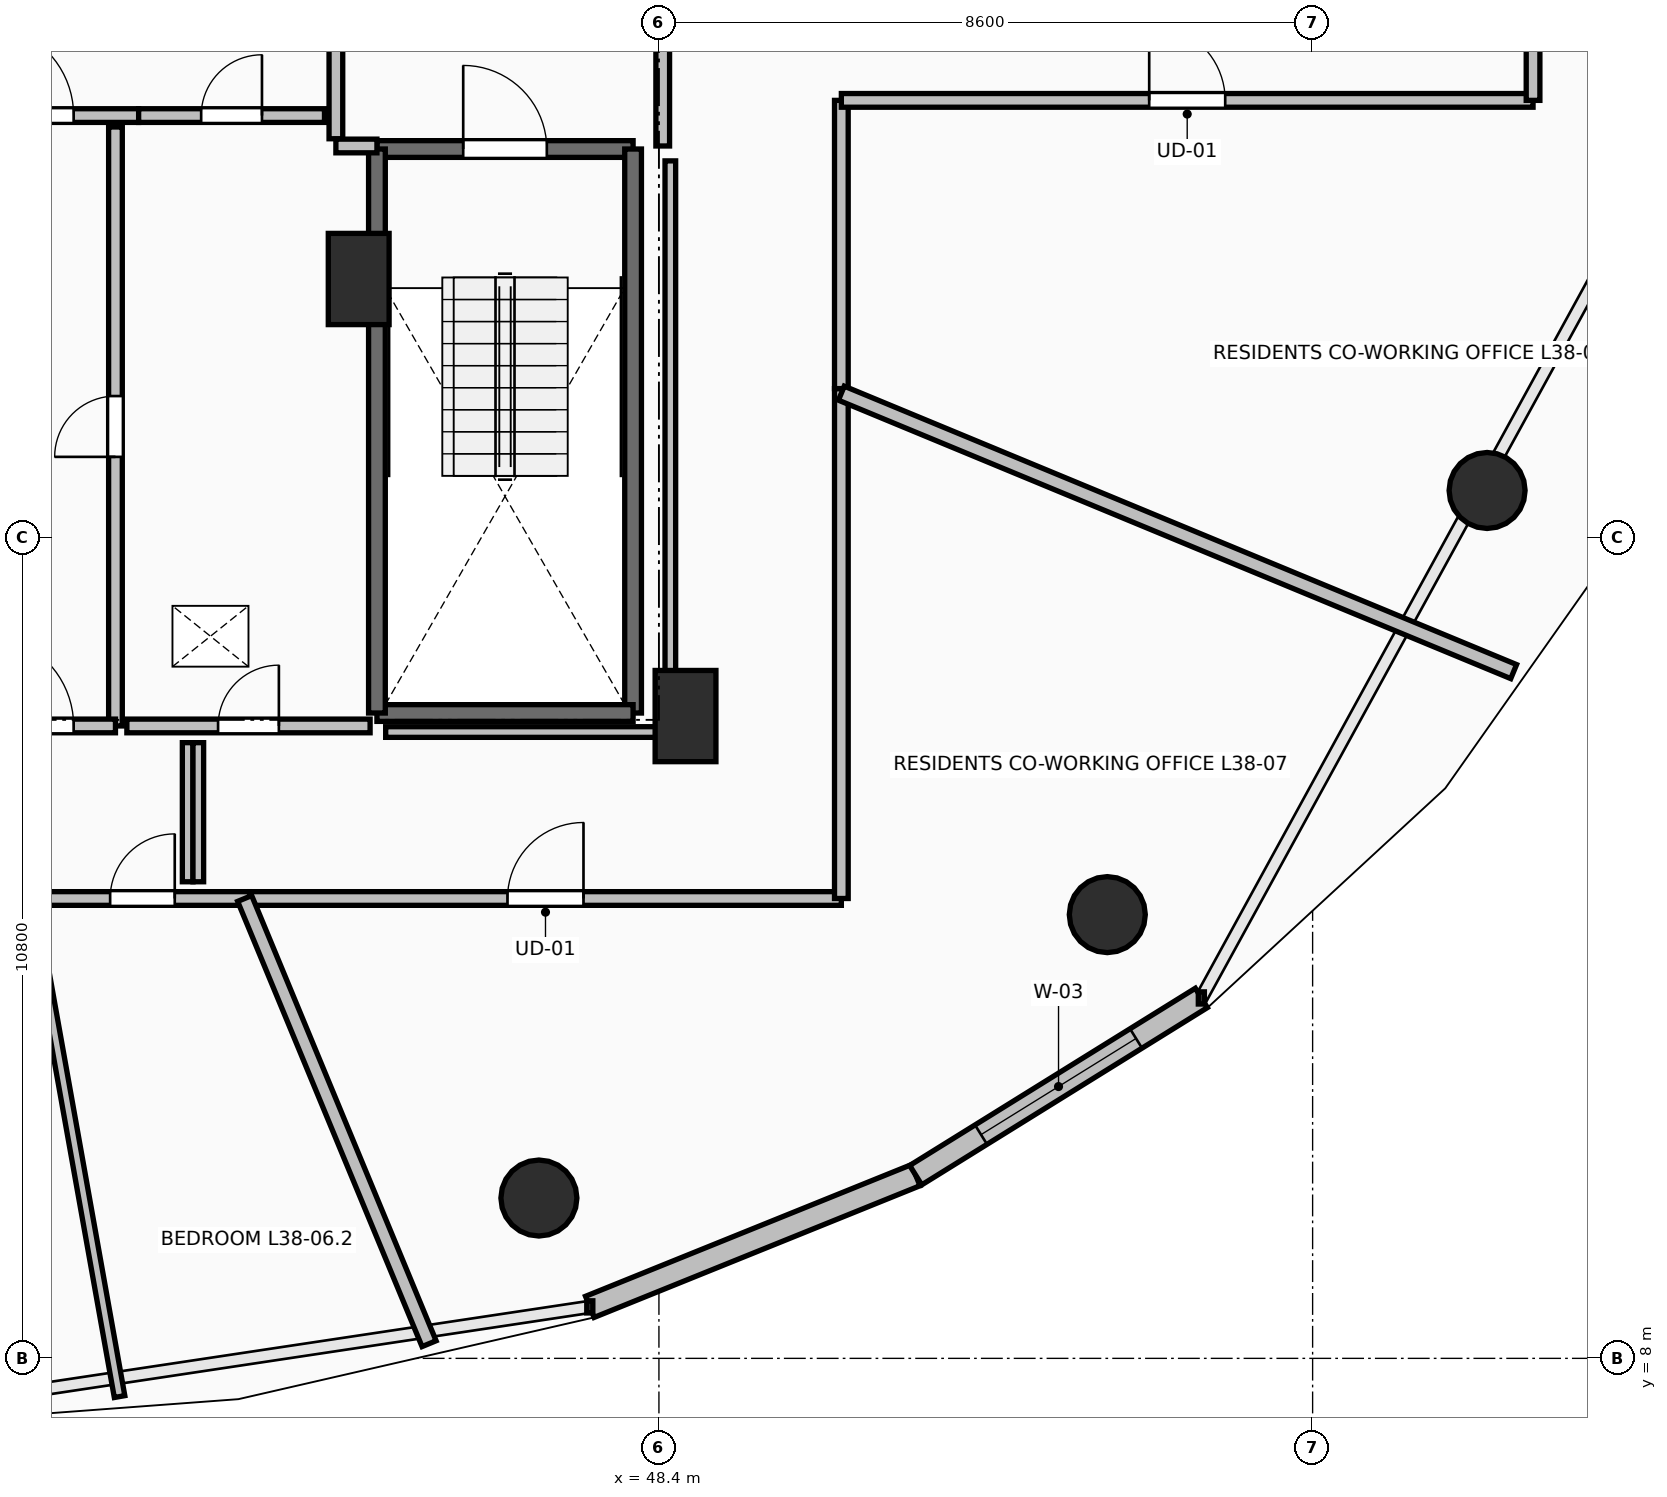
"""IFC4 building model, lengths in metres.
Left out: names, types, materials, properties, quantities, classifications, styles, units other than length and angle.
Written with IfcOpenShell. Run it as: python <this file> out.ifc"""

import sys

from ifc_helpers import new_model, si_unit, direction, frame, frame_2d, origin, origin_2d, place, context, subcontext, project, spatial, rectangle, circle, extrude, element, fill, save


model = new_model("IFC4")
c1 = context("Model", 3, precision=1e-05, world=origin(), true_north=direction((0.0, 1.0)))
c2 = subcontext(c1, "Body", "Model", "MODEL_VIEW")
j1 = project(units=[si_unit("LENGTHUNIT", "METRE"), si_unit("PLANEANGLEUNIT", "RADIAN")], contexts=[c1])
p1 = place(None, origin())
s1 = spatial("IfcSite", under=j1, at=p1, CompositionType="ELEMENT")
p2 = place(p1, origin())
s2 = spatial("IfcBuilding", under=s1, at=p2, CompositionType="ELEMENT")
p3 = place(p2, frame((0.0, 0.0, 143.1)))
s3 = spatial("IfcBuildingStorey", under=s2, at=p3, CompositionType="ELEMENT", Elevation=143.1)
for number, where, z_axis, x_axis in (
    (1, (46.821, 10.109, 0.0), (0.0, 0.0, 1.0), (0.383, -0.924, 0.0)),
    (2, (54.299, 13.838, 0.0), (0.0, 0.0, 1.0), (0.707, -0.707, 0.0)),
    (3, (59.295, 19.418, 0.0), (0.0, 0.0, 1.0), (0.924, -0.383, 0.0)),
):
    element("IfcColumn", number, at=place(p3, frame(where, z_axis=z_axis, x_axis=x_axis)), inside=s3, PredefinedType="COLUMN", context=c2, shape_type="SweptSolid", body=[
        extrude(circle(Radius=0.5, at=origin_2d()), origin(), (0.0, 0.0, 1.0), 3.5),
    ])
for number, where, z_axis, x_axis in (
    (4, (48.75, 16.45, 0.0), (0.0, 0.0, 1.0), (1.0, 0.0, 0.0)),
    (5, (44.45, 22.2, 0.0), (0.0, 0.0, 1.0), (1.0, 0.0, 0.0)),
):
    element("IfcColumn", number, at=place(p3, frame(where, z_axis=z_axis, x_axis=x_axis)), inside=s3, PredefinedType="PILASTER", context=c2, shape_type="SweptSolid", body=[
        extrude(rectangle(XDim=0.8, YDim=1.2, at=origin_2d()), origin(), (0.0, 0.0, 1.0), 3.5),
    ])
p4 = place(p3, frame((47.49, 8.677, 0.0), z_axis=(0.0, 0.0, 1.0), x_axis=(0.927156504392, 0.374674280359, 0.0)))
e6 = element("IfcWall", 6, at=p4, inside=s3, PredefinedType="STANDARD", context=c2, shape_type="SweptSolid", body=[
    extrude(rectangle(XDim=4.625, YDim=0.3, at=frame_2d((2.312, 0.0))), origin(), (0.0, 0.0, 1.0), 3.24),
])
p5 = place(p3, frame((51.778, 10.41, 0.0), z_axis=(0.0, 0.0, 1.0), x_axis=(0.849721181976, 0.527232313977, 0.0)))
e7 = element("IfcWall", 7, at=p5, inside=s3, PredefinedType="STANDARD", context=c2, shape_type="SweptSolid", body=[
    extrude(rectangle(XDim=4.423, YDim=0.3, at=frame_2d((2.211, 0.0))), origin(), (0.0, 0.0, 1.0), 3.24),
])
p6 = place(p5, frame((1.011, 0.0, 0.85)))
e8 = element("IfcOpeningElement", 8, at=p6, cuts=e7, PredefinedType="OPENING", context=c2, shape_type="SweptSolid", body=[
    extrude(rectangle(XDim=2.4, YDim=2.19, at=frame_2d((1.2, 1.095))), frame((0.0, 0.165, 0.0), z_axis=(0.0, -1.0, 0.0), x_axis=(1.0, 0.0, 0.0)), (0.0, 0.0, 1.0), 0.33),
])
p7 = place(p3, frame((44.69, 23.91, 0.0), z_axis=(0.0, 0.0, 1.0), x_axis=(1.0, 0.0, 0.0)))
e9 = element("IfcWall", 9, at=p7, inside=s3, PredefinedType="SOLIDWALL", context=c2, shape_type="SweptSolid", body=[
    extrude(rectangle(XDim=3.37, YDim=0.22, at=frame_2d((1.685, 0.0))), origin(), (0.0, 0.0, 1.0), 3.24),
])
p8 = place(p7, frame((1.135, 0.0, 0.0)))
e10 = element("IfcOpeningElement", 10, at=p8, cuts=e9, PredefinedType="OPENING", context=c2, shape_type="SweptSolid", body=[
    extrude(rectangle(XDim=1.1, YDim=2.15, at=frame_2d((0.55, 1.075))), frame((0.0, 0.125, 0.0), z_axis=(0.0, -1.0, 0.0), x_axis=(1.0, 0.0, 0.0)), (0.0, 0.0, 1.0), 0.25),
])
p9 = place(p3, frame((48.06, 23.91, 0.0), z_axis=(0.0, 0.0, 1.0), x_axis=(0.0, -1.0, 0.0)))
e11 = element("IfcWall", 11, at=p9, inside=s3, PredefinedType="SOLIDWALL", context=c2, shape_type="SweptSolid", body=[
    extrude(rectangle(XDim=7.42, YDim=0.22, at=frame_2d((3.71, 0.0))), origin(), (0.0, 0.0, 1.0), 3.24),
])
p10 = place(p3, frame((48.06, 16.49, 0.0), z_axis=(0.0, 0.0, 1.0), x_axis=(-1.0, 0.0, 0.0)))
e12 = element("IfcWall", 12, at=p10, inside=s3, PredefinedType="SOLIDWALL", context=c2, shape_type="SweptSolid", body=[
    extrude(rectangle(XDim=3.37, YDim=0.22, at=frame_2d((1.685, 0.0))), origin(), (0.0, 0.0, 1.0), 3.24),
])
p11 = place(p3, frame((44.69, 16.49, 0.0), z_axis=(0.0, 0.0, 1.0), x_axis=(0.0, 1.0, 0.0)))
e13 = element("IfcWall", 13, at=p11, inside=s3, PredefinedType="SOLIDWALL", context=c2, shape_type="SweptSolid", body=[
    extrude(rectangle(XDim=7.42, YDim=0.22, at=frame_2d((3.71, 0.0))), origin(), (0.0, 0.0, 1.0), 3.24),
])
p12 = place(p3, frame((44.15, 27.955, 0.0), z_axis=(0.0, 0.0, 1.0), x_axis=(0.0, -1.0, 0.0)))
e14 = element("IfcWall", 14, at=p12, inside=s3, PredefinedType="PARTITIONING", context=c2, shape_type="SweptSolid", body=[
    extrude(rectangle(XDim=3.91, YDim=0.18, at=frame_2d((1.955, 0.0))), origin(), (0.0, 0.0, 1.0), 3.24),
])
p13 = place(p12, frame((1.355, 0.0, 0.0)))
e15 = element("IfcOpeningElement", 15, at=p13, cuts=e14, PredefinedType="OPENING", context=c2, shape_type="SweptSolid", body=[
    extrude(rectangle(XDim=1.2, YDim=2.15, at=frame_2d((0.6, 1.075))), frame((0.0, 0.105, 0.0), z_axis=(0.0, -1.0, 0.0), x_axis=(1.0, 0.0, 0.0)), (0.0, 0.0, 1.0), 0.21),
])
p14 = place(p3, frame((44.15, 23.95, 0.0), z_axis=(0.0, 0.0, 1.0), x_axis=(1.0, 0.0, 0.0)))
e16 = element("IfcWall", 16, at=p14, inside=s3, PredefinedType="PARTITIONING", context=c2, shape_type="SweptSolid", body=[
    extrude(rectangle(XDim=0.54, YDim=0.18, at=frame_2d((0.27, 0.0))), origin(), (0.0, 0.0, 1.0), 3.24),
])
p15 = place(p3, frame((48.45, 23.95, 0.0), z_axis=(0.0, 0.0, 1.0), x_axis=(0.0, 1.0, 0.0)))
e17 = element("IfcWall", 17, at=p15, inside=s3, PredefinedType="PARTITIONING", context=c2, shape_type="SweptSolid", body=[
    extrude(rectangle(XDim=4.05, YDim=0.18, at=frame_2d((2.025, 0.0))), origin(), (0.0, 0.0, 1.0), 3.24),
])
p16 = place(p15, frame((1.425, 0.0, 0.0)))
e18 = element("IfcOpeningElement", 18, at=p16, cuts=e17, PredefinedType="OPENING", context=c2, shape_type="SweptSolid", body=[
    extrude(rectangle(XDim=1.2, YDim=2.15, at=frame_2d((0.6, 1.075))), frame((0.0, 0.105, 0.0), z_axis=(0.0, -1.0, 0.0), x_axis=(1.0, 0.0, 0.0)), (0.0, 0.0, 1.0), 0.21),
])
p17 = place(p3, frame((38.645, 24.35, 0.0), z_axis=(0.0, 0.0, 1.0), x_axis=(1.0, 0.0, 0.0)))
e19 = element("IfcWall", 19, at=p17, inside=s3, PredefinedType="PARTITIONING", context=c2, shape_type="SweptSolid", body=[
    extrude(rectangle(XDim=2.91, YDim=0.18, at=frame_2d((1.455, 0.0))), origin(), (0.0, 0.0, 1.0), 3.24),
])
p18 = place(p17, frame((0.855, 0.0, 0.0)))
e20 = element("IfcOpeningElement", 20, at=p18, cuts=e19, PredefinedType="OPENING", context=c2, shape_type="SweptSolid", body=[
    extrude(rectangle(XDim=1.2, YDim=2.15, at=frame_2d((0.6, 1.075))), frame((0.0, 0.105, 0.0), z_axis=(0.0, -1.0, 0.0), x_axis=(1.0, 0.0, 0.0)), (0.0, 0.0, 1.0), 0.21),
])
p19 = place(p3, frame((41.555, 24.35, 0.0), z_axis=(0.0, 0.0, 1.0), x_axis=(1.0, 0.0, 0.0)))
e21 = element("IfcWall", 21, at=p19, inside=s3, PredefinedType="PARTITIONING", context=c2, shape_type="SweptSolid", body=[
    extrude(rectangle(XDim=2.445, YDim=0.18, at=frame_2d((1.223, 0.0))), origin(), (0.0, 0.0, 1.0), 3.24),
])
p20 = place(p19, frame((0.823, 0.0, 0.0)))
e22 = element("IfcOpeningElement", 22, at=p20, cuts=e21, PredefinedType="OPENING", context=c2, shape_type="SweptSolid", body=[
    extrude(rectangle(XDim=0.8, YDim=2.05, at=frame_2d((0.4, 1.025))), frame((0.0, 0.105, 0.0), z_axis=(0.0, -1.0, 0.0), x_axis=(1.0, 0.0, 0.0)), (0.0, 0.0, 1.0), 0.21),
])
p21 = place(p3, frame((41.25, 16.32, 0.0), z_axis=(0.0, 0.0, 1.0), x_axis=(0.0, 1.0, 0.0)))
e23 = element("IfcWall", 23, at=p21, inside=s3, PredefinedType="PARTITIONING", context=c2, shape_type="SweptSolid", body=[
    extrude(rectangle(XDim=7.88, YDim=0.18, at=frame_2d((3.94, 0.0))), origin(), (0.0, 0.0, 1.0), 3.24),
])
p22 = place(p21, frame((3.54, 0.0, 0.0)))
e24 = element("IfcOpeningElement", 24, at=p22, cuts=e23, PredefinedType="OPENING", context=c2, shape_type="SweptSolid", body=[
    extrude(rectangle(XDim=0.8, YDim=2.05, at=frame_2d((0.4, 1.025))), frame((0.0, 0.105, 0.0), z_axis=(0.0, -1.0, 0.0), x_axis=(1.0, 0.0, 0.0)), (0.0, 0.0, 1.0), 0.21),
])
p23 = place(p3, frame((38.95, 16.32, 0.0), z_axis=(0.0, 0.0, 1.0), x_axis=(1.0, 0.0, 0.0)))
e25 = element("IfcWall", 25, at=p23, inside=s3, PredefinedType="PARTITIONING", context=c2, shape_type="SweptSolid", body=[
    extrude(rectangle(XDim=2.3, YDim=0.18, at=frame_2d((1.15, 0.0))), origin(), (0.0, 0.0, 1.0), 3.24),
])
p24 = place(p23, frame((0.55, 0.0, 0.0)))
e26 = element("IfcOpeningElement", 26, at=p24, cuts=e25, PredefinedType="OPENING", context=c2, shape_type="SweptSolid", body=[
    extrude(rectangle(XDim=1.2, YDim=2.15, at=frame_2d((0.6, 1.075))), frame((0.0, 0.105, 0.0), z_axis=(0.0, -1.0, 0.0), x_axis=(1.0, 0.0, 0.0)), (0.0, 0.0, 1.0), 0.21),
])
p25 = place(p3, frame((41.4, 16.32, 0.0), z_axis=(0.0, 0.0, 1.0), x_axis=(1.0, 0.0, 0.0)))
e27 = element("IfcWall", 27, at=p25, inside=s3, PredefinedType="PARTITIONING", context=c2, shape_type="SweptSolid", body=[
    extrude(rectangle(XDim=3.2, YDim=0.18, at=frame_2d((1.6, 0.0))), origin(), (0.0, 0.0, 1.0), 3.24),
])
p26 = place(p25, frame((1.2, 0.0, 0.0)))
e28 = element("IfcOpeningElement", 28, at=p26, cuts=e27, PredefinedType="OPENING", context=c2, shape_type="SweptSolid", body=[
    extrude(rectangle(XDim=0.8, YDim=2.05, at=frame_2d((0.4, 1.025))), frame((0.0, 0.105, 0.0), z_axis=(0.0, -1.0, 0.0), x_axis=(1.0, 0.0, 0.0)), (0.0, 0.0, 1.0), 0.21),
])
p27 = place(p3, frame((40.195, 14.05, 0.0), z_axis=(0.0, 0.0, 1.0), x_axis=(1.0, 0.0, 0.0)))
e29 = element("IfcWall", 29, at=p27, inside=s3, PredefinedType="PARTITIONING", context=c2, shape_type="SweptSolid", body=[
    extrude(rectangle(XDim=2.82, YDim=0.18, at=frame_2d((1.41, 0.0))), origin(), (0.0, 0.0, 1.0), 2.972),
])
p28 = place(p27, frame((0.985, 0.0, 0.0)))
e30 = element("IfcOpeningElement", 30, at=p28, cuts=e29, PredefinedType="OPENING", context=c2, shape_type="SweptSolid", body=[
    extrude(rectangle(XDim=0.85, YDim=2.1, at=frame_2d((0.425, 1.05))), frame((0.0, 0.105, 0.0), z_axis=(0.0, -1.0, 0.0), x_axis=(1.0, 0.0, 0.0)), (0.0, 0.0, 1.0), 0.21),
])
p29 = place(p3, frame((43.015, 14.05, 0.0), z_axis=(0.0, 0.0, 1.0), x_axis=(1.0, 0.0, 0.0)))
e31 = element("IfcWall", 31, at=p29, inside=s3, PredefinedType="PARTITIONING", context=c2, shape_type="SweptSolid", body=[
    extrude(rectangle(XDim=7.785, YDim=0.18, at=frame_2d((3.893, 0.0))), origin(), (0.0, 0.0, 1.0), 2.432),
])
p30 = place(p29, frame((3.393, 0.0, 0.0)))
e32 = element("IfcOpeningElement", 32, at=p30, cuts=e31, PredefinedType="OPENING", context=c2, shape_type="SweptSolid", body=[
    extrude(rectangle(XDim=1.0, YDim=2.15, at=frame_2d((0.5, 1.075))), frame((0.0, 0.105, 0.0), z_axis=(0.0, -1.0, 0.0), x_axis=(1.0, 0.0, 0.0)), (0.0, 0.0, 1.0), 0.21),
])
p31 = place(p3, frame((50.8, 14.05, 0.0), z_axis=(0.0, 0.0, 1.0), x_axis=(0.0, 1.0, 0.0)))
e33 = element("IfcWall", 33, at=p31, inside=s3, PredefinedType="PARTITIONING", context=c2, shape_type="SweptSolid", body=[
    extrude(rectangle(XDim=6.708, YDim=0.18, at=frame_2d((3.354, 0.0))), origin(), (0.0, 0.0, 1.0), 2.432),
])
p32 = place(p3, frame((50.8, 20.758, 0.0), z_axis=(0.0, 0.0, 1.0), x_axis=(0.0, 1.0, 0.0)))
e34 = element("IfcWall", 34, at=p32, inside=s3, PredefinedType="PARTITIONING", context=c2, shape_type="SweptSolid", body=[
    extrude(rectangle(XDim=3.792, YDim=0.18, at=frame_2d((1.896, 0.0))), origin(), (0.0, 0.0, 1.0), 3.24),
])
p33 = place(p3, frame((50.8, 24.55, 0.0), z_axis=(0.0, 0.0, 1.0), x_axis=(1.0, 0.0, 0.0)))
e35 = element("IfcWall", 35, at=p33, inside=s3, PredefinedType="PARTITIONING", context=c2, shape_type="SweptSolid", body=[
    extrude(rectangle(XDim=9.1, YDim=0.18, at=frame_2d((4.55, 0.0))), origin(), (0.0, 0.0, 1.0), 2.432),
])
p34 = place(p33, frame((4.05, 0.0, 0.0)))
e36 = element("IfcOpeningElement", 36, at=p34, cuts=e35, PredefinedType="OPENING", context=c2, shape_type="SweptSolid", body=[
    extrude(rectangle(XDim=1.0, YDim=2.15, at=frame_2d((0.5, 1.075))), frame((0.0, 0.105, 0.0), z_axis=(0.0, -1.0, 0.0), x_axis=(1.0, 0.0, 0.0)), (0.0, 0.0, 1.0), 0.21),
])
p35 = place(p3, frame((59.9, 24.55, 0.0), z_axis=(0.0, 0.0, 1.0), x_axis=(0.0, 1.0, 0.0)))
e37 = element("IfcWall", 37, at=p35, inside=s3, PredefinedType="PARTITIONING", context=c2, shape_type="SweptSolid", body=[
    extrude(rectangle(XDim=2.7, YDim=0.18, at=frame_2d((1.35, 0.0))), origin(), (0.0, 0.0, 1.0), 2.432),
])
p36 = place(p3, frame((41.304, 7.497, 0.0), z_axis=(0.0, 0.0, 1.0), x_axis=(-0.175753825846, 0.984434148484, 0.0)))
e38 = element("IfcWall", 38, at=p36, inside=s3, PredefinedType="PARTITIONING", context=c2, shape_type="SweptSolid", body=[
    extrude(rectangle(XDim=6.656, YDim=0.14, at=frame_2d((3.328, 0.0))), origin(), (0.0, 0.0, 1.0), 2.432),
])
p37 = place(p3, frame((45.376, 8.193, 0.0), z_axis=(0.0, 0.0, 1.0), x_axis=(-0.382683979298, 0.923879305964, 0.0)))
e39 = element("IfcWall", 39, at=p37, inside=s3, PredefinedType="PARTITIONING", context=c2, shape_type="SweptSolid", body=[
    extrude(rectangle(XDim=6.34, YDim=0.2, at=frame_2d((3.17, 0.0))), origin(), (0.0, 0.0, 1.0), 2.432),
])
p38 = place(p3, frame((59.645, 17.035, 0.0), z_axis=(0.0, 0.0, 1.0), x_axis=(-0.923902460479, 0.382628074665, 0.0)))
e40 = element("IfcWall", 40, at=p38, inside=s3, PredefinedType="PARTITIONING", context=c2, shape_type="SweptSolid", body=[
    extrude(rectangle(XDim=9.573, YDim=0.2, at=frame_2d((4.787, 0.0))), origin(), (0.0, 0.0, 1.0), 2.728),
])
p39 = place(p3, frame((48.55, 16.24, 0.0), z_axis=(0.0, 0.0, 1.0), x_axis=(0.0, 1.0, 0.0)))
e41 = element("IfcWall", 41, at=p39, inside=s3, PredefinedType="PARTITIONING", context=c2, shape_type="SweptSolid", body=[
    extrude(rectangle(XDim=7.514, YDim=0.14, at=frame_2d((3.757, 0.0))), origin(), (0.0, 0.0, 1.0), 2.432),
])
for number, where, z_axis, x_axis in (
    (42, (42.2, 16.1, 0.0), (0.0, 0.0, 1.0), (0.0, -1.0, 0.0)),
    (43, (42.34, 14.27, 0.0), (0.0, 0.0, 1.0), (0.0, 1.0, 0.0)),
):
    element("IfcWall", number, at=place(p3, frame(where, z_axis=z_axis, x_axis=x_axis)), inside=s3, PredefinedType="PARTITIONING", context=c2, shape_type="SweptSolid", body=[
        extrude(rectangle(XDim=1.83, YDim=0.14, at=frame_2d((0.915, 0.0))), origin(), (0.0, 0.0, 1.0), 3.24),
    ])
p40 = place(p3, frame((44.805, 16.24, 0.0), z_axis=(0.0, 0.0, 1.0), x_axis=(1.0, 0.0, 0.0)))
e44 = element("IfcWall", 44, at=p40, inside=s3, PredefinedType="PARTITIONING", context=c2, shape_type="SweptSolid", body=[
    extrude(rectangle(XDim=3.745, YDim=0.14, at=frame_2d((1.873, 0.0))), origin(), (0.0, 0.0, 1.0), 2.432),
])
p41 = place(p6, origin())
e45 = element("IfcWindow", 45, at=p41, inside=s3, PartitioningType="SINGLE_PANEL", PredefinedType="WINDOW", context=c2, shape_type="SweptSolid", body=[
    extrude(rectangle(XDim=2.4, YDim=2.19, at=frame_2d((1.2, 1.095))), frame((0.0, 0.03, 0.0), z_axis=(0.0, -1.0, 0.0), x_axis=(1.0, 0.0, 0.0)), (0.0, 0.0, 1.0), 0.06),
])
fill(e8, e45)
p42 = place(p8, origin())
e46 = element("IfcDoor", 46, at=p42, inside=s3, OperationType="SINGLE_SWING_LEFT", PredefinedType="DOOR", context=c2, shape_type="SweptSolid", body=[
    extrude(rectangle(XDim=1.1, YDim=2.15, at=frame_2d((0.55, 1.075))), frame((0.0, 0.025, 0.0), z_axis=(0.0, -1.0, 0.0), x_axis=(1.0, 0.0, 0.0)), (0.0, 0.0, 1.0), 0.05),
])
fill(e10, e46)
p43 = place(p18, origin())
e47 = element("IfcDoor", 47, at=p43, inside=s3, OperationType="SINGLE_SWING_LEFT", PredefinedType="DOOR", context=c2, shape_type="SweptSolid", body=[
    extrude(rectangle(XDim=1.2, YDim=2.15, at=frame_2d((0.6, 1.075))), frame((0.0, 0.025, 0.0), z_axis=(0.0, -1.0, 0.0), x_axis=(1.0, 0.0, 0.0)), (0.0, 0.0, 1.0), 0.05),
])
fill(e20, e47)
p44 = place(p20, origin())
e48 = element("IfcDoor", 48, at=p44, inside=s3, OperationType="SINGLE_SWING_RIGHT", PredefinedType="DOOR", context=c2, shape_type="SweptSolid", body=[
    extrude(rectangle(XDim=0.8, YDim=2.05, at=frame_2d((0.4, 1.025))), frame((0.0, 0.025, 0.0), z_axis=(0.0, -1.0, 0.0), x_axis=(1.0, 0.0, 0.0)), (0.0, 0.0, 1.0), 0.05),
])
fill(e22, e48)
p45 = place(p22, origin())
e49 = element("IfcDoor", 49, at=p45, inside=s3, OperationType="SINGLE_SWING_LEFT", PredefinedType="DOOR", context=c2, shape_type="SweptSolid", body=[
    extrude(rectangle(XDim=0.8, YDim=2.05, at=frame_2d((0.4, 1.025))), frame((0.0, 0.025, 0.0), z_axis=(0.0, -1.0, 0.0), x_axis=(1.0, 0.0, 0.0)), (0.0, 0.0, 1.0), 0.05),
])
fill(e24, e49)
p46 = place(p24, origin())
e50 = element("IfcDoor", 50, at=p46, inside=s3, OperationType="SINGLE_SWING_LEFT", PredefinedType="DOOR", context=c2, shape_type="SweptSolid", body=[
    extrude(rectangle(XDim=1.2, YDim=2.15, at=frame_2d((0.6, 1.075))), frame((0.0, 0.025, 0.0), z_axis=(0.0, -1.0, 0.0), x_axis=(1.0, 0.0, 0.0)), (0.0, 0.0, 1.0), 0.05),
])
fill(e26, e50)
p47 = place(p26, origin())
e51 = element("IfcDoor", 51, at=p47, inside=s3, OperationType="SINGLE_SWING_RIGHT", PredefinedType="DOOR", context=c2, shape_type="SweptSolid", body=[
    extrude(rectangle(XDim=0.8, YDim=2.05, at=frame_2d((0.4, 1.025))), frame((0.0, 0.025, 0.0), z_axis=(0.0, -1.0, 0.0), x_axis=(1.0, 0.0, 0.0)), (0.0, 0.0, 1.0), 0.05),
])
fill(e28, e51)
p48 = place(p30, origin())
e52 = element("IfcDoor", 52, at=p48, inside=s3, OperationType="SINGLE_SWING_RIGHT", PredefinedType="DOOR", context=c2, shape_type="SweptSolid", body=[
    extrude(rectangle(XDim=1.0, YDim=2.15, at=frame_2d((0.5, 1.075))), frame((0.0, 0.025, 0.0), z_axis=(0.0, -1.0, 0.0), x_axis=(1.0, 0.0, 0.0)), (0.0, 0.0, 1.0), 0.05),
])
fill(e32, e52)
p49 = place(p34, origin())
e53 = element("IfcDoor", 53, at=p49, inside=s3, OperationType="SINGLE_SWING_LEFT", PredefinedType="DOOR", context=c2, shape_type="SweptSolid", body=[
    extrude(rectangle(XDim=1.0, YDim=2.15, at=frame_2d((0.5, 1.075))), frame((0.0, 0.025, 0.0), z_axis=(0.0, -1.0, 0.0), x_axis=(1.0, 0.0, 0.0)), (0.0, 0.0, 1.0), 0.05),
])
fill(e36, e53)
p50 = place(p28, origin())
e54 = element("IfcDoor", 54, at=p50, inside=s3, OperationType="SINGLE_SWING_RIGHT", PredefinedType="DOOR", context=c2, shape_type="SweptSolid", body=[
    extrude(rectangle(XDim=0.85, YDim=2.1, at=frame_2d((0.425, 1.05))), frame((0.0, 0.025, 0.0), z_axis=(0.0, -1.0, 0.0), x_axis=(1.0, 0.0, 0.0)), (0.0, 0.0, 1.0), 0.05),
])
fill(e30, e54)
save(model, sys.argv[1])
